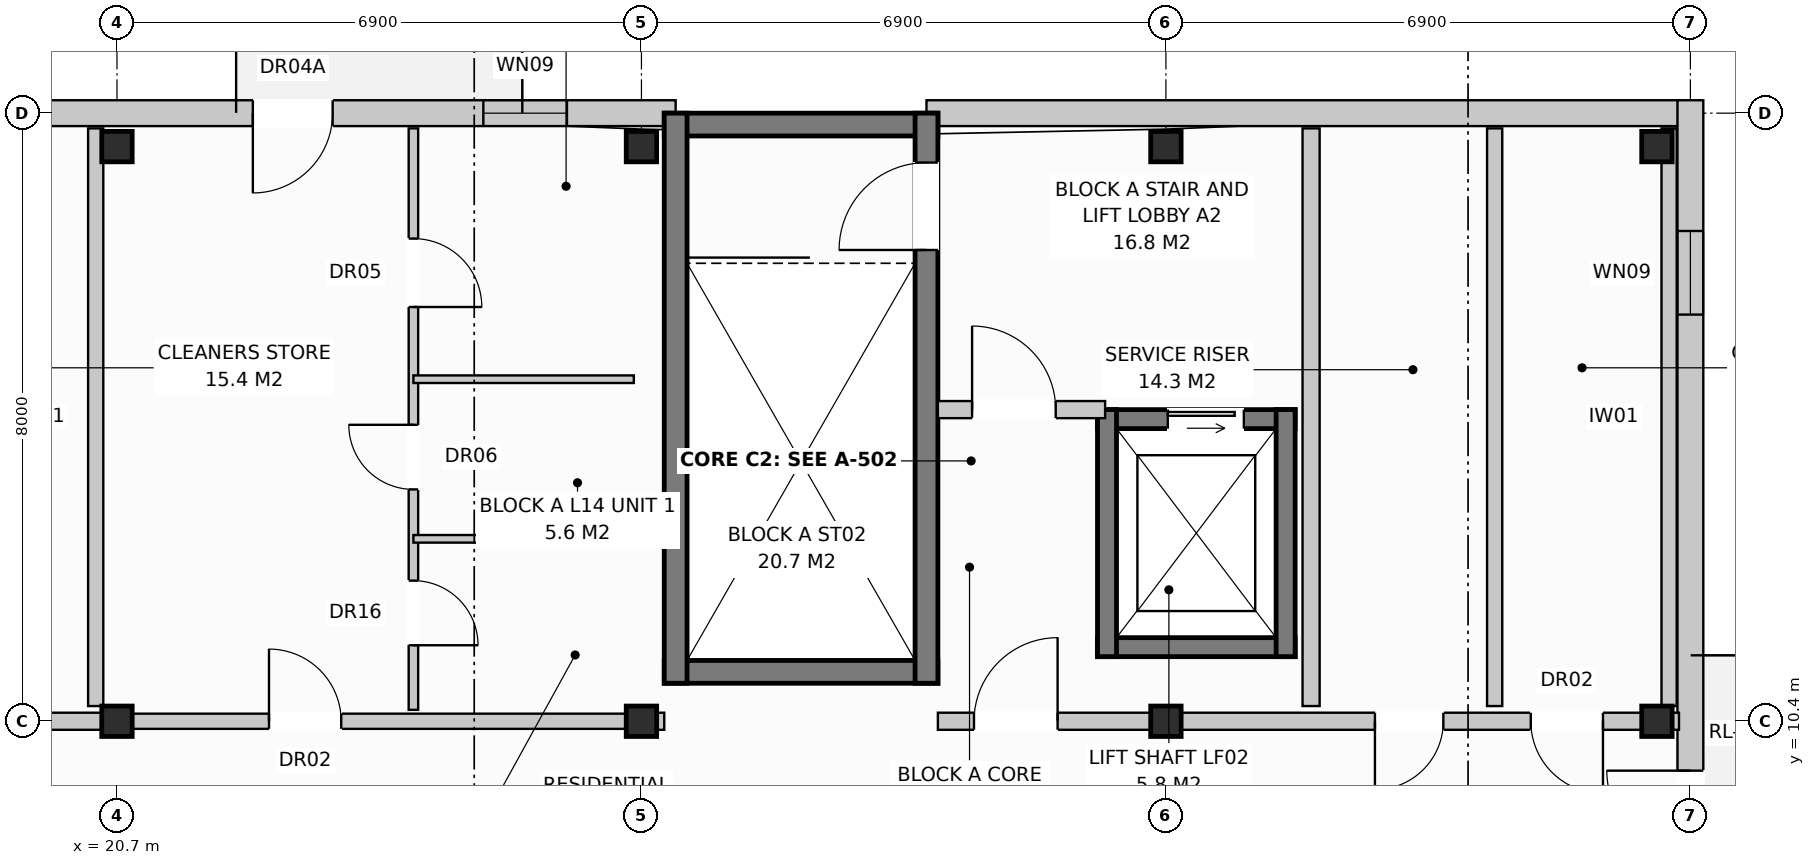
"""IFC4 building model, lengths in metres.
Left out: names, types, materials, properties, quantities, classifications, styles, units other than length and angle.
Written with IfcOpenShell. Run it as: python <this file> out.ifc"""

import sys

from ifc_helpers import new_model, si_unit, direction, frame, frame_2d, origin, origin_with_axes, origin_2d, place, context, subcontext, project, spatial, rectangle, extrude, element, fill, save


model = new_model("IFC4")
c1 = context("Model", 3, precision=1e-05, world=origin(), true_north=direction((0.0, 1.0)))
c2 = subcontext(c1, "Body", "Model", "MODEL_VIEW")
j1 = project(units=[si_unit("LENGTHUNIT", "METRE"), si_unit("PLANEANGLEUNIT", "RADIAN")], contexts=[c1])
p1 = place(None, origin())
s1 = spatial("IfcSite", under=j1, at=p1, CompositionType="ELEMENT")
p2 = place(p1, origin())
s2 = spatial("IfcBuilding", under=s1, at=p2, CompositionType="ELEMENT")
p3 = place(p2, frame((0.0, 0.0, 46.4)))
s3 = spatial("IfcBuildingStorey", under=s2, at=p3, CompositionType="ELEMENT", Elevation=46.4)
for number, where, z_axis, x_axis in (
    (1, (20.7, 10.4, 0.0), (0.0, 0.0, 1.0), (1.0, 0.0, 0.0)),
    (2, (20.7, 17.96, 0.0), (0.0, 0.0, 1.0), (1.0, 0.0, 0.0)),
    (3, (27.6, 10.4, 0.0), (0.0, 0.0, 1.0), (1.0, 0.0, 0.0)),
    (4, (27.6, 17.96, 0.0), (0.0, 0.0, 1.0), (1.0, 0.0, 0.0)),
    (5, (34.5, 10.4, 0.0), (0.0, 0.0, 1.0), (1.0, 0.0, 0.0)),
    (6, (34.5, 17.96, 0.0), (0.0, 0.0, 1.0), (1.0, 0.0, 0.0)),
    (7, (40.96, 10.4, 0.0), (0.0, 0.0, 1.0), (1.0, 0.0, 0.0)),
    (8, (40.96, 17.96, 0.0), (0.0, 0.0, 1.0), (1.0, 0.0, 0.0)),
):
    element("IfcColumn", number, at=place(p3, frame(where, z_axis=z_axis, x_axis=x_axis)), inside=s3, PredefinedType="COLUMN", context=c2, shape_type="SweptSolid", body=[
        extrude(rectangle(XDim=0.4, YDim=0.4, at=origin_2d()), origin(), (0.0, 0.0, 1.0), 3.2),
    ])
p4 = place(p3, frame((10.65, 18.4, 0.0), z_axis=(0.0, 0.0, 1.0), x_axis=(1.0, 0.0, 0.0)))
e9 = element("IfcWall", 9, at=p4, inside=s3, PredefinedType="STANDARD", context=c2, shape_type="SweptSolid", body=[
    extrude(rectangle(XDim=17.4, YDim=0.34, at=frame_2d((8.7, 0.0))), origin(), (0.0, 0.0, 1.0), 2.91),
])
p5 = place(p4, frame((11.837, 0.0, 0.0)))
e10 = element("IfcOpeningElement", 10, at=p5, cuts=e9, PredefinedType="OPENING", context=c2, shape_type="SweptSolid", body=[
    extrude(rectangle(XDim=1.05, YDim=2.12, at=frame_2d((0.525, 1.06))), frame((0.0, 0.182, 0.0), z_axis=(0.0, -1.0, 0.0), x_axis=(1.0, 0.0, 0.0)), (0.0, 0.0, 1.0), 0.364),
])
p6 = place(p4, frame((14.87, 0.0, 0.72)))
e11 = element("IfcOpeningElement", 11, at=p6, cuts=e9, PredefinedType="OPENING", context=c2, shape_type="SweptSolid", body=[
    extrude(rectangle(XDim=1.1, YDim=1.5, at=frame_2d((0.55, 0.75))), frame((0.0, 0.182, 0.0), z_axis=(0.0, -1.0, 0.0), x_axis=(1.0, 0.0, 0.0)), (0.0, 0.0, 1.0), 0.364),
])
p7 = place(p3, frame((31.35, 18.4, 0.0), z_axis=(0.0, 0.0, 1.0), x_axis=(1.0, 0.0, 0.0)))
e12 = element("IfcWall", 12, at=p7, inside=s3, PredefinedType="STANDARD", context=c2, shape_type="SweptSolid", body=[
    extrude(rectangle(XDim=9.89, YDim=0.34, at=frame_2d((4.945, 0.0))), origin(), (0.0, 0.0, 1.0), 2.91),
])
p8 = place(p3, frame((41.4, -0.17, 0.0), z_axis=(0.0, 0.0, 1.0), x_axis=(0.0, 1.0, 0.0)))
e13 = element("IfcWall", 13, at=p8, inside=s3, PredefinedType="STANDARD", context=c2, shape_type="SweptSolid", body=[
    extrude(rectangle(XDim=18.74, YDim=0.34, at=frame_2d((9.37, 0.0))), origin(), (0.0, 0.0, 1.0), 2.91),
])
p9 = place(p8, frame((8.82, 0.0, 0.0)))
e14 = element("IfcOpeningElement", 14, at=p9, cuts=e13, PredefinedType="OPENING", context=c2, shape_type="SweptSolid", body=[
    extrude(rectangle(XDim=1.1, YDim=2.1, at=frame_2d((0.55, 1.05))), frame((0.0, 0.182, 0.0), z_axis=(0.0, -1.0, 0.0), x_axis=(1.0, 0.0, 0.0)), (0.0, 0.0, 1.0), 0.364),
])
p10 = place(p8, frame((1.72, 0.0, 0.72)))
e15 = element("IfcOpeningElement", 15, at=p10, cuts=e13, PredefinedType="OPENING", context=c2, shape_type="SweptSolid", body=[
    extrude(rectangle(XDim=1.1, YDim=1.5, at=frame_2d((0.55, 0.75))), frame((0.0, 0.182, 0.0), z_axis=(0.0, -1.0, 0.0), x_axis=(1.0, 0.0, 0.0)), (0.0, 0.0, 1.0), 0.364),
])
p11 = place(p8, frame((15.92, 0.0, 0.72)))
e16 = element("IfcOpeningElement", 16, at=p11, cuts=e13, PredefinedType="OPENING", context=c2, shape_type="SweptSolid", body=[
    extrude(rectangle(XDim=1.1, YDim=1.5, at=frame_2d((0.55, 0.75))), frame((0.0, 0.182, 0.0), z_axis=(0.0, -1.0, 0.0), x_axis=(1.0, 0.0, 0.0)), (0.0, 0.0, 1.0), 0.364),
])
p12 = place(p3, frame((20.42, 10.6, 0.0), z_axis=(0.0, 0.0, 1.0), x_axis=(0.0, 1.0, 0.0)))
e17 = element("IfcWall", 17, at=p12, inside=s3, PredefinedType="PARTITIONING", context=c2, shape_type="SweptSolid", body=[
    extrude(rectangle(XDim=7.6, YDim=0.2, at=frame_2d((3.8, 0.0))), origin(), (0.0, 0.0, 1.0), 2.91),
])
p13 = place(p3, frame((10.8, 10.4, 0.0), z_axis=(0.0, 0.0, 1.0), x_axis=(1.0, 0.0, 0.0)))
e18 = element("IfcWall", 18, at=p13, inside=s3, PredefinedType="PARTITIONING", context=c2, shape_type="SweptSolid", body=[
    extrude(rectangle(XDim=9.9, YDim=0.225, at=frame_2d((4.95, 0.0))), origin(), (0.0, 0.0, 1.0), 2.35),
])
p14 = place(p13, frame((0.475, 0.0, 0.0)))
e19 = element("IfcOpeningElement", 19, at=p14, cuts=e18, PredefinedType="OPENING", context=c2, shape_type="SweptSolid", body=[
    extrude(rectangle(XDim=1.1, YDim=2.15, at=frame_2d((0.55, 1.075))), frame((0.0, 0.125, 0.0), z_axis=(0.0, -1.0, 0.0), x_axis=(1.0, 0.0, 0.0)), (0.0, 0.0, 1.0), 0.249),
])
p15 = place(p13, frame((5.75, 0.0, 0.0)))
e20 = element("IfcOpeningElement", 20, at=p15, cuts=e18, PredefinedType="OPENING", context=c2, shape_type="SweptSolid", body=[
    extrude(rectangle(XDim=0.9, YDim=2.1, at=frame_2d((0.45, 1.05))), frame((0.0, 0.125, 0.0), z_axis=(0.0, -1.0, 0.0), x_axis=(1.0, 0.0, 0.0)), (0.0, 0.0, 1.0), 0.249),
])
p16 = place(p13, frame((7.8, 0.0, 0.0)))
e21 = element("IfcOpeningElement", 21, at=p16, cuts=e18, PredefinedType="OPENING", context=c2, shape_type="SweptSolid", body=[
    extrude(rectangle(XDim=0.95, YDim=2.15, at=frame_2d((0.475, 1.075))), frame((0.0, 0.125, 0.0), z_axis=(0.0, -1.0, 0.0), x_axis=(1.0, 0.0, 0.0)), (0.0, 0.0, 1.0), 0.249),
])
for number, where, z_axis, x_axis in (
    (22, (27.9, 18.25, 0.0), (0.0, 0.0, 1.0), (1.0, 0.0, 0.0)),
    (23, (27.9, 11.05, 0.0), (0.0, 0.0, 1.0), (1.0, 0.0, 0.0)),
):
    element("IfcWall", number, at=place(p3, frame(where, z_axis=z_axis, x_axis=x_axis)), inside=s3, PredefinedType="SHEAR", context=c2, shape_type="SweptSolid", body=[
        extrude(rectangle(XDim=3.6, YDim=0.3, at=frame_2d((1.8, 0.0))), origin(), (0.0, 0.0, 1.0), 2.91),
    ])
p17 = place(p3, frame((28.05, 10.9, 0.0), z_axis=(0.0, 0.0, 1.0), x_axis=(0.0, 1.0, 0.0)))
e24 = element("IfcWall", 24, at=p17, inside=s3, PredefinedType="SHEAR", context=c2, shape_type="SweptSolid", body=[
    extrude(rectangle(XDim=7.5, YDim=0.3, at=frame_2d((3.75, 0.0))), origin(), (0.0, 0.0, 1.0), 2.91),
])
p18 = place(p3, frame((31.35, 10.9, 0.0), z_axis=(0.0, 0.0, 1.0), x_axis=(0.0, 1.0, 0.0)))
e25 = element("IfcWall", 25, at=p18, inside=s3, PredefinedType="SHEAR", context=c2, shape_type="SweptSolid", body=[
    extrude(rectangle(XDim=7.5, YDim=0.3, at=frame_2d((3.75, 0.0))), origin(), (0.0, 0.0, 1.0), 2.91),
])
p19 = place(p18, frame((5.7, 0.0, 0.0)))
e26 = element("IfcOpeningElement", 26, at=p19, cuts=e25, PredefinedType="OPENING", context=c2, shape_type="SweptSolid", body=[
    extrude(rectangle(XDim=1.15, YDim=2.15, at=frame_2d((0.575, 1.075))), frame((0.0, 0.162, 0.0), z_axis=(0.0, -1.0, 0.0), x_axis=(1.0, 0.0, 0.0)), (0.0, 0.0, 1.0), 0.324),
])
p20 = place(p3, frame((33.6, 14.375, 0.0), z_axis=(0.0, 0.0, 1.0), x_axis=(1.0, 0.0, 0.0)))
e27 = element("IfcWall", 27, at=p20, inside=s3, PredefinedType="SHEAR", context=c2, shape_type="SweptSolid", body=[
    extrude(rectangle(XDim=2.6, YDim=0.25, at=frame_2d((1.3, 0.0))), origin(), (0.0, 0.0, 1.0), 2.91),
])
p21 = place(p20, frame((0.925, 0.0, 0.0)))
e28 = element("IfcOpeningElement", 28, at=p21, cuts=e27, PredefinedType="OPENING", context=c2, shape_type="SweptSolid", body=[
    extrude(rectangle(XDim=1.0, YDim=2.1, at=frame_2d((0.5, 1.05))), frame((0.0, 0.137, 0.0), z_axis=(0.0, -1.0, 0.0), x_axis=(1.0, 0.0, 0.0)), (0.0, 0.0, 1.0), 0.274),
])
p22 = place(p3, frame((33.6, 11.375, 0.0), z_axis=(0.0, 0.0, 1.0), x_axis=(1.0, 0.0, 0.0)))
e29 = element("IfcWall", 29, at=p22, inside=s3, PredefinedType="SHEAR", context=c2, shape_type="SweptSolid", body=[
    extrude(rectangle(XDim=2.6, YDim=0.25, at=frame_2d((1.3, 0.0))), origin(), (0.0, 0.0, 1.0), 2.91),
])
for number, where, z_axis, x_axis in (
    (30, (33.725, 11.25, 0.0), (0.0, 0.0, 1.0), (0.0, 1.0, 0.0)),
    (31, (36.075, 11.25, 0.0), (0.0, 0.0, 1.0), (0.0, 1.0, 0.0)),
):
    element("IfcWall", number, at=place(p3, frame(where, z_axis=z_axis, x_axis=x_axis)), inside=s3, PredefinedType="SHEAR", context=c2, shape_type="SweptSolid", body=[
        extrude(rectangle(XDim=3.25, YDim=0.25, at=frame_2d((1.625, 0.0))), origin(), (0.0, 0.0, 1.0), 2.91),
    ])
p23 = place(p3, frame((36.41, 10.6, 0.0), z_axis=(0.0, 0.0, 1.0), x_axis=(0.0, 1.0, 0.0)))
e32 = element("IfcWall", 32, at=p23, inside=s3, PredefinedType="PARTITIONING", context=c2, shape_type="SweptSolid", body=[
    extrude(rectangle(XDim=7.6, YDim=0.225, at=frame_2d((3.8, 0.0))), origin(), (0.0, 0.0, 1.0), 2.59),
])
p24 = place(p3, frame((31.5, 14.5, 0.0), z_axis=(0.0, 0.0, 1.0), x_axis=(1.0, 0.0, 0.0)))
e33 = element("IfcWall", 33, at=p24, inside=s3, PredefinedType="PARTITIONING", context=c2, shape_type="SweptSolid", body=[
    extrude(rectangle(XDim=2.2, YDim=0.225, at=frame_2d((1.1, 0.0))), origin(), (0.0, 0.0, 1.0), 2.91),
])
p25 = place(p24, frame((0.45, 0.0, 0.0)))
e34 = element("IfcOpeningElement", 34, at=p25, cuts=e33, PredefinedType="OPENING", context=c2, shape_type="SweptSolid", body=[
    extrude(rectangle(XDim=1.1, YDim=2.15, at=frame_2d((0.55, 1.075))), frame((0.0, 0.125, 0.0), z_axis=(0.0, -1.0, 0.0), x_axis=(1.0, 0.0, 0.0)), (0.0, 0.0, 1.0), 0.249),
])
p26 = place(p3, frame((27.6, 10.4, 0.0), z_axis=(0.0, 0.0, 1.0), x_axis=(1.0, 0.0, 0.0)))
e35 = element("IfcWall", 35, at=p26, inside=s3, PredefinedType="PARTITIONING", context=c2, shape_type="SweptSolid", body=[
    extrude(rectangle(XDim=0.3, YDim=0.225, at=frame_2d((0.15, 0.0))), origin(), (0.0, 0.0, 1.0), 2.91),
])
p27 = place(p3, frame((38.825, 10.6, 0.0), z_axis=(0.0, 0.0, 1.0), x_axis=(0.0, 1.0, 0.0)))
e36 = element("IfcWall", 36, at=p27, inside=s3, PredefinedType="PARTITIONING", context=c2, shape_type="SweptSolid", body=[
    extrude(rectangle(XDim=7.6, YDim=0.2, at=frame_2d((3.8, 0.0))), origin(), (0.0, 0.0, 1.0), 2.91),
])
p28 = place(p3, frame((41.12, 10.6, 0.0), z_axis=(0.0, 0.0, 1.0), x_axis=(0.0, 1.0, 0.0)))
e37 = element("IfcWall", 37, at=p28, inside=s3, PredefinedType="PARTITIONING", context=c2, shape_type="SweptSolid", body=[
    extrude(rectangle(XDim=7.6, YDim=0.2, at=frame_2d((3.8, 0.0))), origin(), (0.0, 0.0, 1.0), 2.35),
])
p29 = place(p3, frame((31.5, 10.4, 0.0), z_axis=(0.0, 0.0, 1.0), x_axis=(1.0, 0.0, 0.0)))
e38 = element("IfcWall", 38, at=p29, inside=s3, PredefinedType="PARTITIONING", context=c2, shape_type="SweptSolid", body=[
    extrude(rectangle(XDim=9.75, YDim=0.225, at=frame_2d((4.875, 0.0))), origin(), (0.0, 0.0, 1.0), 2.35),
])
p30 = place(p29, frame((0.475, 0.0, 0.0)))
e39 = element("IfcOpeningElement", 39, at=p30, cuts=e38, PredefinedType="OPENING", context=c2, shape_type="SweptSolid", body=[
    extrude(rectangle(XDim=1.1, YDim=2.15, at=frame_2d((0.55, 1.075))), frame((0.0, 0.125, 0.0), z_axis=(0.0, -1.0, 0.0), x_axis=(1.0, 0.0, 0.0)), (0.0, 0.0, 1.0), 0.249),
])
p31 = place(p29, frame((5.75, 0.0, 0.0)))
e40 = element("IfcOpeningElement", 40, at=p31, cuts=e38, PredefinedType="OPENING", context=c2, shape_type="SweptSolid", body=[
    extrude(rectangle(XDim=0.9, YDim=2.1, at=frame_2d((0.45, 1.05))), frame((0.0, 0.125, 0.0), z_axis=(0.0, -1.0, 0.0), x_axis=(1.0, 0.0, 0.0)), (0.0, 0.0, 1.0), 0.249),
])
p32 = place(p29, frame((7.8, 0.0, 0.0)))
e41 = element("IfcOpeningElement", 41, at=p32, cuts=e38, PredefinedType="OPENING", context=c2, shape_type="SweptSolid", body=[
    extrude(rectangle(XDim=0.95, YDim=2.15, at=frame_2d((0.475, 1.075))), frame((0.0, 0.125, 0.0), z_axis=(0.0, -1.0, 0.0), x_axis=(1.0, 0.0, 0.0)), (0.0, 0.0, 1.0), 0.249),
])
p33 = place(p3, frame((20.7, 10.4, 0.0), z_axis=(0.0, 0.0, 1.0), x_axis=(1.0, 0.0, 0.0)))
e42 = element("IfcWall", 42, at=p33, inside=s3, PredefinedType="PARTITIONING", context=c2, shape_type="SweptSolid", body=[
    extrude(rectangle(XDim=6.9, YDim=0.2, at=frame_2d((3.45, 0.0))), origin(), (0.0, 0.0, 1.0), 2.35),
])
p34 = place(p33, frame((2.0, 0.0, 0.0)))
e43 = element("IfcOpeningElement", 43, at=p34, cuts=e42, PredefinedType="OPENING", context=c2, shape_type="SweptSolid", body=[
    extrude(rectangle(XDim=0.95, YDim=2.15, at=frame_2d((0.475, 1.075))), frame((0.0, 0.112, 0.0), z_axis=(0.0, -1.0, 0.0), x_axis=(1.0, 0.0, 0.0)), (0.0, 0.0, 1.0), 0.224),
])
p35 = place(p3, frame((24.6, 10.55, 0.0), z_axis=(0.0, 0.0, 1.0), x_axis=(0.0, 1.0, 0.0)))
e44 = element("IfcWall", 44, at=p35, inside=s3, PredefinedType="PARTITIONING", context=c2, shape_type="SweptSolid", body=[
    extrude(rectangle(XDim=7.65, YDim=0.125, at=frame_2d((3.825, 0.0))), origin(), (0.0, 0.0, 1.0), 2.91),
])
p36 = place(p35, frame((0.85, 0.0, 0.0)))
e45 = element("IfcOpeningElement", 45, at=p36, cuts=e44, PredefinedType="OPENING", context=c2, shape_type="SweptSolid", body=[
    extrude(rectangle(XDim=0.85, YDim=2.1, at=frame_2d((0.425, 1.05))), frame((0.0, 0.074, 0.0), z_axis=(0.0, -1.0, 0.0), x_axis=(1.0, 0.0, 0.0)), (0.0, 0.0, 1.0), 0.149),
])
p37 = place(p35, frame((2.9, 0.0, 0.0)))
e46 = element("IfcOpeningElement", 46, at=p37, cuts=e44, PredefinedType="OPENING", context=c2, shape_type="SweptSolid", body=[
    extrude(rectangle(XDim=0.85, YDim=2.05, at=frame_2d((0.425, 1.025))), frame((0.0, 0.074, 0.0), z_axis=(0.0, -1.0, 0.0), x_axis=(1.0, 0.0, 0.0)), (0.0, 0.0, 1.0), 0.149),
])
p38 = place(p35, frame((5.3, 0.0, 0.0)))
e47 = element("IfcOpeningElement", 47, at=p38, cuts=e44, PredefinedType="OPENING", context=c2, shape_type="SweptSolid", body=[
    extrude(rectangle(XDim=0.9, YDim=2.1, at=frame_2d((0.45, 1.05))), frame((0.0, 0.074, 0.0), z_axis=(0.0, -1.0, 0.0), x_axis=(1.0, 0.0, 0.0)), (0.0, 0.0, 1.0), 0.149),
])
for number, where, z_axis, x_axis in (
    (48, (24.6, 12.8, 0.0), (0.0, 0.0, 1.0), (1.0, 0.0, 0.0)),
    (49, (24.6, 14.9, 0.0), (0.0, 0.0, 1.0), (1.0, 0.0, 0.0)),
):
    element("IfcWall", number, at=place(p3, frame(where, z_axis=z_axis, x_axis=x_axis)), inside=s3, PredefinedType="PARTITIONING", context=c2, shape_type="SweptSolid", body=[
        extrude(rectangle(XDim=2.9, YDim=0.1, at=frame_2d((1.45, 0.0))), origin(), (0.0, 0.0, 1.0), 2.91),
    ])
p39 = place(p5, frame((1.05, 0.0, 0.0), z_axis=(0.0, 0.0, 1.0), x_axis=(-1.0, 0.0, 0.0)))
e50 = element("IfcDoor", 50, at=p39, inside=s3, OperationType="SINGLE_SWING_LEFT", PredefinedType="DOOR", context=c2, shape_type="SweptSolid", body=[
    extrude(rectangle(XDim=1.05, YDim=2.12, at=frame_2d((0.525, 1.06))), frame((0.0, 0.025, 0.0), z_axis=(0.0, -1.0, 0.0), x_axis=(1.0, 0.0, 0.0)), (0.0, 0.0, 1.0), 0.05),
])
fill(e10, e50)
p40 = place(p6, origin_with_axes())
e51 = element("IfcWindow", 51, at=p40, inside=s3, PartitioningType="SINGLE_PANEL", PredefinedType="WINDOW", context=c2, shape_type="SweptSolid", body=[
    extrude(rectangle(XDim=1.1, YDim=1.5, at=frame_2d((0.55, 0.75))), frame((0.0, 0.03, 0.0), z_axis=(0.0, -1.0, 0.0), x_axis=(1.0, 0.0, 0.0)), (0.0, 0.0, 1.0), 0.06),
])
fill(e11, e51)
p41 = place(p9, origin_with_axes())
e52 = element("IfcDoor", 52, at=p41, inside=s3, OperationType="SINGLE_SWING_RIGHT", PredefinedType="DOOR", context=c2, shape_type="SweptSolid", body=[
    extrude(rectangle(XDim=1.1, YDim=2.1, at=frame_2d((0.55, 1.05))), frame((0.0, 0.025, 0.0), z_axis=(0.0, -1.0, 0.0), x_axis=(1.0, 0.0, 0.0)), (0.0, 0.0, 1.0), 0.05),
])
fill(e14, e52)
p42 = place(p11, origin_with_axes())
e53 = element("IfcWindow", 53, at=p42, inside=s3, PartitioningType="SINGLE_PANEL", PredefinedType="WINDOW", context=c2, shape_type="SweptSolid", body=[
    extrude(rectangle(XDim=1.1, YDim=1.5, at=frame_2d((0.55, 0.75))), frame((0.0, 0.03, 0.0), z_axis=(0.0, -1.0, 0.0), x_axis=(1.0, 0.0, 0.0)), (0.0, 0.0, 1.0), 0.06),
])
fill(e16, e53)
p43 = place(p19, origin_with_axes())
e54 = element("IfcDoor", 54, at=p43, inside=s3, OperationType="SINGLE_SWING_LEFT", PredefinedType="DOOR", context=c2, shape_type="SweptSolid", body=[
    extrude(rectangle(XDim=1.15, YDim=2.15, at=frame_2d((0.575, 1.075))), frame((0.0, 0.025, 0.0), z_axis=(0.0, -1.0, 0.0), x_axis=(1.0, 0.0, 0.0)), (0.0, 0.0, 1.0), 0.05),
])
fill(e26, e54)
p44 = place(p21, origin_with_axes())
e55 = element("IfcDoor", 55, at=p44, inside=s3, OperationType="SLIDING_TO_LEFT", PredefinedType="DOOR", context=c2, shape_type="SweptSolid", body=[
    extrude(rectangle(XDim=1.0, YDim=2.1, at=frame_2d((0.5, 1.05))), frame((0.0, 0.025, 0.0), z_axis=(0.0, -1.0, 0.0), x_axis=(1.0, 0.0, 0.0)), (0.0, 0.0, 1.0), 0.05),
])
fill(e28, e55)
p45 = place(p25, origin_with_axes())
e56 = element("IfcDoor", 56, at=p45, inside=s3, OperationType="SINGLE_SWING_LEFT", PredefinedType="DOOR", context=c2, shape_type="SweptSolid", body=[
    extrude(rectangle(XDim=1.1, YDim=2.15, at=frame_2d((0.55, 1.075))), frame((0.0, 0.025, 0.0), z_axis=(0.0, -1.0, 0.0), x_axis=(1.0, 0.0, 0.0)), (0.0, 0.0, 1.0), 0.05),
])
fill(e34, e56)
p46 = place(p30, origin_with_axes())
e57 = element("IfcDoor", 57, at=p46, inside=s3, OperationType="SINGLE_SWING_RIGHT", PredefinedType="DOOR", context=c2, shape_type="SweptSolid", body=[
    extrude(rectangle(XDim=1.1, YDim=2.15, at=frame_2d((0.55, 1.075))), frame((0.0, 0.025, 0.0), z_axis=(0.0, -1.0, 0.0), x_axis=(1.0, 0.0, 0.0)), (0.0, 0.0, 1.0), 0.05),
])
fill(e39, e57)
p47 = place(p31, frame((0.9, 0.0, 0.0), z_axis=(0.0, 0.0, 1.0), x_axis=(-1.0, 0.0, 0.0)))
e58 = element("IfcDoor", 58, at=p47, inside=s3, OperationType="SINGLE_SWING_LEFT", PredefinedType="DOOR", context=c2, shape_type="SweptSolid", body=[
    extrude(rectangle(XDim=0.9, YDim=2.1, at=frame_2d((0.45, 1.05))), frame((0.0, 0.025, 0.0), z_axis=(0.0, -1.0, 0.0), x_axis=(1.0, 0.0, 0.0)), (0.0, 0.0, 1.0), 0.05),
])
fill(e40, e58)
p48 = place(p32, frame((0.95, 0.0, 0.0), z_axis=(0.0, 0.0, 1.0), x_axis=(-1.0, 0.0, 0.0)))
e59 = element("IfcDoor", 59, at=p48, inside=s3, OperationType="SINGLE_SWING_RIGHT", PredefinedType="DOOR", context=c2, shape_type="SweptSolid", body=[
    extrude(rectangle(XDim=0.95, YDim=2.15, at=frame_2d((0.475, 1.075))), frame((0.0, 0.025, 0.0), z_axis=(0.0, -1.0, 0.0), x_axis=(1.0, 0.0, 0.0)), (0.0, 0.0, 1.0), 0.05),
])
fill(e41, e59)
p49 = place(p34, origin_with_axes())
e60 = element("IfcDoor", 60, at=p49, inside=s3, OperationType="SINGLE_SWING_LEFT", PredefinedType="DOOR", context=c2, shape_type="SweptSolid", body=[
    extrude(rectangle(XDim=0.95, YDim=2.15, at=frame_2d((0.475, 1.075))), frame((0.0, 0.025, 0.0), z_axis=(0.0, -1.0, 0.0), x_axis=(1.0, 0.0, 0.0)), (0.0, 0.0, 1.0), 0.05),
])
fill(e43, e60)
p50 = place(p36, frame((0.85, 0.0, 0.0), z_axis=(0.0, 0.0, 1.0), x_axis=(-1.0, 0.0, 0.0)))
e61 = element("IfcDoor", 61, at=p50, inside=s3, OperationType="SINGLE_SWING_LEFT", PredefinedType="DOOR", context=c2, shape_type="SweptSolid", body=[
    extrude(rectangle(XDim=0.85, YDim=2.1, at=frame_2d((0.425, 1.05))), frame((0.0, 0.025, 0.0), z_axis=(0.0, -1.0, 0.0), x_axis=(1.0, 0.0, 0.0)), (0.0, 0.0, 1.0), 0.05),
])
fill(e45, e61)
p51 = place(p37, origin_with_axes())
e62 = element("IfcDoor", 62, at=p51, inside=s3, OperationType="SINGLE_SWING_RIGHT", PredefinedType="DOOR", context=c2, shape_type="SweptSolid", body=[
    extrude(rectangle(XDim=0.85, YDim=2.05, at=frame_2d((0.425, 1.025))), frame((0.0, 0.025, 0.0), z_axis=(0.0, -1.0, 0.0), x_axis=(1.0, 0.0, 0.0)), (0.0, 0.0, 1.0), 0.05),
])
fill(e46, e62)
p52 = place(p38, frame((0.9, 0.0, 0.0), z_axis=(0.0, 0.0, 1.0), x_axis=(-1.0, 0.0, 0.0)))
e63 = element("IfcDoor", 63, at=p52, inside=s3, OperationType="SINGLE_SWING_LEFT", PredefinedType="DOOR", context=c2, shape_type="SweptSolid", body=[
    extrude(rectangle(XDim=0.9, YDim=2.1, at=frame_2d((0.45, 1.05))), frame((0.0, 0.025, 0.0), z_axis=(0.0, -1.0, 0.0), x_axis=(1.0, 0.0, 0.0)), (0.0, 0.0, 1.0), 0.05),
])
fill(e47, e63)
save(model, sys.argv[1])
